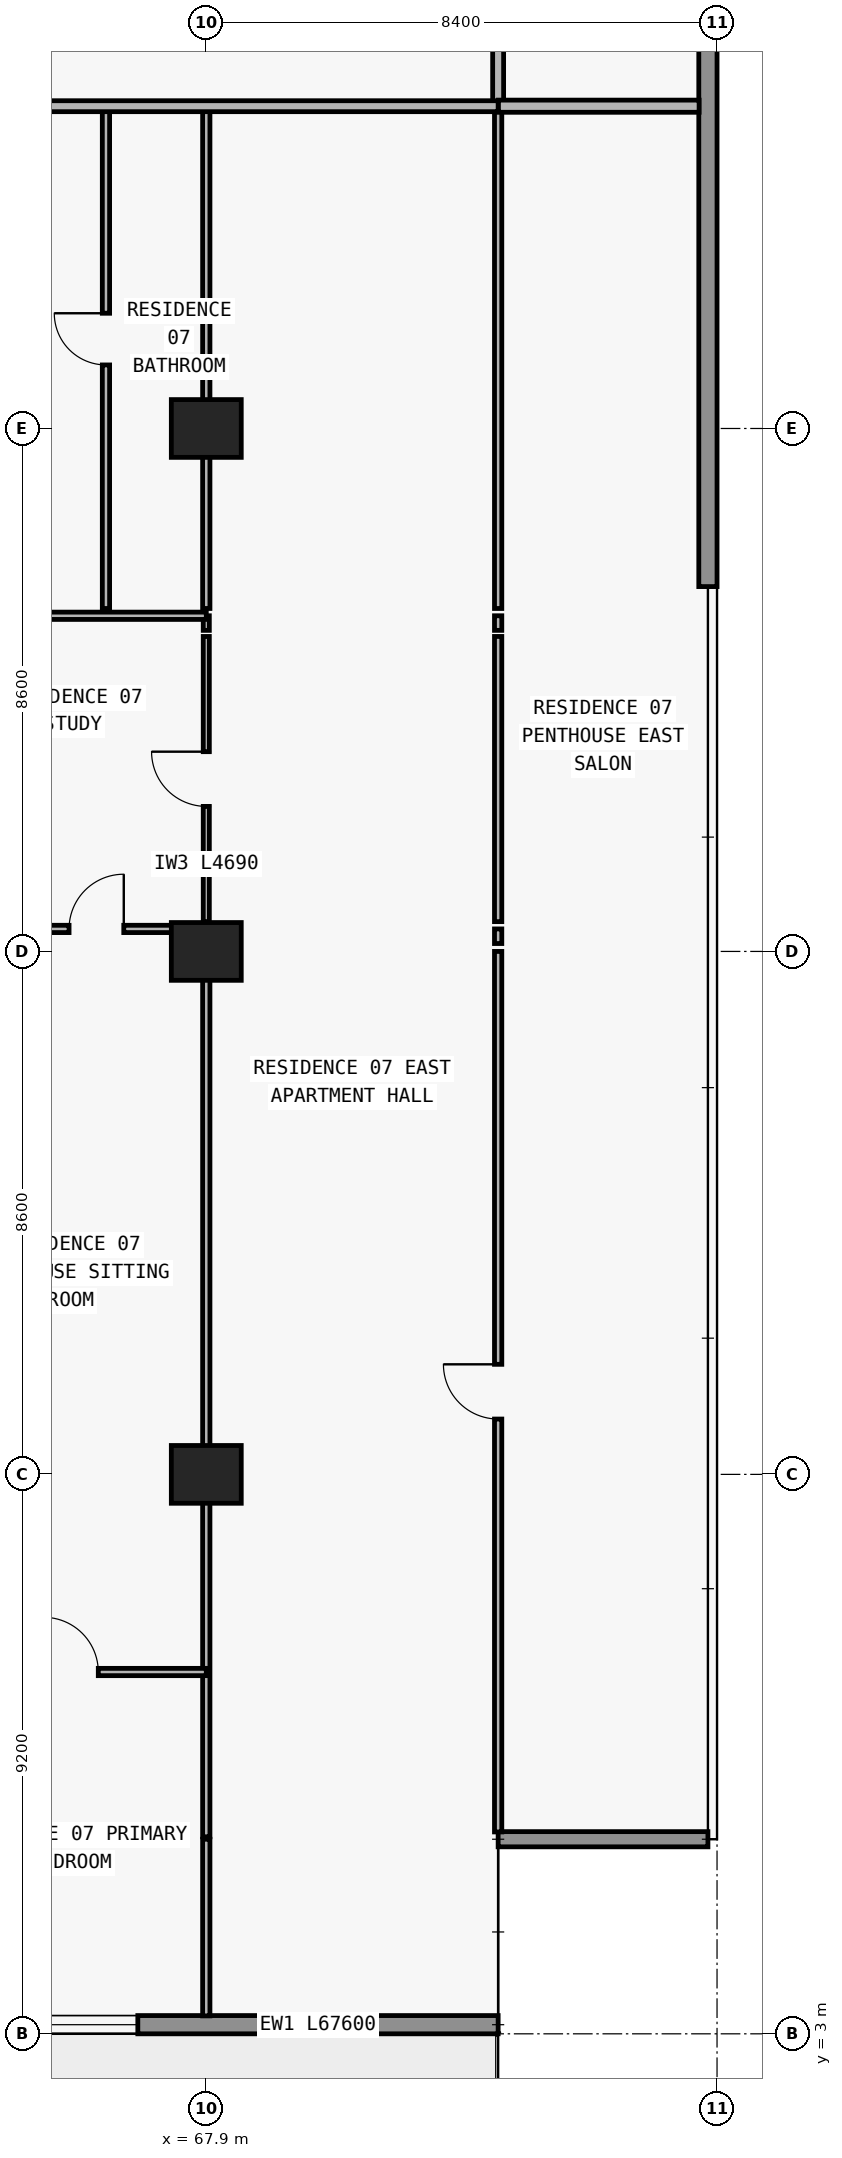
"""IFC4 building model, lengths in metres.
Left out: names, types, materials, properties, quantities, classifications, styles, units other than length and angle.
Written with IfcOpenShell. Run it as: python <this file> out.ifc"""

import sys

from ifc_helpers import new_model, si_unit, direction, frame, frame_2d, origin, origin_2d, place, context, subcontext, project, spatial, rectangle, extrude, element, fill, save


model = new_model("IFC4")
c1 = context("Model", 3, precision=1e-05, world=origin(), true_north=direction((0.0, 1.0)))
c2 = subcontext(c1, "Body", "Model", "MODEL_VIEW")
j1 = project(units=[si_unit("LENGTHUNIT", "METRE"), si_unit("PLANEANGLEUNIT", "RADIAN")], contexts=[c1])
p1 = place(None, origin())
s1 = spatial("IfcSite", under=j1, at=p1, CompositionType="ELEMENT")
p2 = place(p1, origin())
s2 = spatial("IfcBuilding", under=s1, at=p2, CompositionType="ELEMENT")
p3 = place(p2, frame((0.0, 0.0, 66.3)))
s3 = spatial("IfcBuildingStorey", under=s2, at=p3, CompositionType="ELEMENT", Elevation=66.3)
for number, where, z_axis, x_axis in (
    (1, (67.9, 12.2, 0.0), (0.0, 0.0, 1.0), (1.0, 0.0, 0.0)),
    (2, (67.9, 20.8, 0.0), (0.0, 0.0, 1.0), (1.0, 0.0, 0.0)),
    (3, (67.9, 29.4, 0.0), (0.0, 0.0, 1.0), (1.0, 0.0, 0.0)),
):
    element("IfcColumn", number, at=place(p3, frame(where, z_axis=z_axis, x_axis=x_axis)), inside=s3, PredefinedType="COLUMN", context=c2, shape_type="SweptSolid", body=[
        extrude(rectangle(XDim=1.15, YDim=0.95, at=origin_2d()), origin(), (0.0, 0.0, 1.0), 3.05),
    ])
p4 = place(p3, frame((72.7, 3.15, 0.0), z_axis=(0.0, 0.0, 1.0), x_axis=(-1.0, 0.0, 0.0)))
e4 = element("IfcWall", 4, at=p4, inside=s3, PredefinedType="STANDARD", context=c2, shape_type="SweptSolid", body=[
    extrude(rectangle(XDim=67.6, YDim=0.3, at=frame_2d((33.8, 0.0))), origin(), (0.0, 0.0, 1.0), 3.05),
])
p5 = place(p4, frame((59.826, 0.0, 0.0)))
e5 = element("IfcOpeningElement", 5, at=p5, cuts=e4, PredefinedType="OPENING", context=c2, shape_type="SweptSolid", body=[
    extrude(rectangle(XDim=2.0, YDim=2.3, at=frame_2d((1.0, 1.15))), frame((0.0, 0.16, 0.0), z_axis=(0.0, -1.0, 0.0), x_axis=(1.0, 0.0, 0.0)), (0.0, 0.0, 1.0), 0.32),
])
p6 = place(p4, frame((55.526, 0.0, 0.85)))
e6 = element("IfcOpeningElement", 6, at=p6, cuts=e4, PredefinedType="OPENING", context=c2, shape_type="SweptSolid", body=[
    extrude(rectangle(XDim=2.2, YDim=1.55, at=frame_2d((1.1, 0.775))), frame((0.0, 0.16, 0.0), z_axis=(0.0, -1.0, 0.0), x_axis=(1.0, 0.0, 0.0)), (0.0, 0.0, 1.0), 0.32),
])
p7 = place(p4, frame((51.09, 0.0, 0.0)))
e7 = element("IfcOpeningElement", 7, at=p7, cuts=e4, PredefinedType="OPENING", context=c2, shape_type="SweptSolid", body=[
    extrude(rectangle(XDim=2.0, YDim=2.3, at=frame_2d((1.0, 1.15))), frame((0.0, 0.16, 0.0), z_axis=(0.0, -1.0, 0.0), x_axis=(1.0, 0.0, 0.0)), (0.0, 0.0, 1.0), 0.32),
])
p8 = place(p4, frame((46.99, 0.0, 0.85)))
e8 = element("IfcOpeningElement", 8, at=p8, cuts=e4, PredefinedType="OPENING", context=c2, shape_type="SweptSolid", body=[
    extrude(rectangle(XDim=1.8, YDim=1.55, at=frame_2d((0.9, 0.775))), frame((0.0, 0.16, 0.0), z_axis=(0.0, -1.0, 0.0), x_axis=(1.0, 0.0, 0.0)), (0.0, 0.0, 1.0), 0.32),
])
p9 = place(p4, frame((43.026, 0.0, 0.0)))
e9 = element("IfcOpeningElement", 9, at=p9, cuts=e4, PredefinedType="OPENING", context=c2, shape_type="SweptSolid", body=[
    extrude(rectangle(XDim=2.0, YDim=2.3, at=frame_2d((1.0, 1.15))), frame((0.0, 0.16, 0.0), z_axis=(0.0, -1.0, 0.0), x_axis=(1.0, 0.0, 0.0)), (0.0, 0.0, 1.0), 0.32),
])
p10 = place(p4, frame((38.726, 0.0, 0.85)))
e10 = element("IfcOpeningElement", 10, at=p10, cuts=e4, PredefinedType="OPENING", context=c2, shape_type="SweptSolid", body=[
    extrude(rectangle(XDim=2.2, YDim=1.55, at=frame_2d((1.1, 0.775))), frame((0.0, 0.16, 0.0), z_axis=(0.0, -1.0, 0.0), x_axis=(1.0, 0.0, 0.0)), (0.0, 0.0, 1.0), 0.32),
])
p11 = place(p4, frame((34.51, 0.0, 0.0)))
e11 = element("IfcOpeningElement", 11, at=p11, cuts=e4, PredefinedType="OPENING", context=c2, shape_type="SweptSolid", body=[
    extrude(rectangle(XDim=2.0, YDim=2.3, at=frame_2d((1.0, 1.15))), frame((0.0, 0.16, 0.0), z_axis=(0.0, -1.0, 0.0), x_axis=(1.0, 0.0, 0.0)), (0.0, 0.0, 1.0), 0.32),
])
p12 = place(p4, frame((30.81, 0.0, 0.85)))
e12 = element("IfcOpeningElement", 12, at=p12, cuts=e4, PredefinedType="OPENING", context=c2, shape_type="SweptSolid", body=[
    extrude(rectangle(XDim=1.8, YDim=1.55, at=frame_2d((0.9, 0.775))), frame((0.0, 0.16, 0.0), z_axis=(0.0, -1.0, 0.0), x_axis=(1.0, 0.0, 0.0)), (0.0, 0.0, 1.0), 0.32),
])
p13 = place(p4, frame((27.026, 0.0, 0.0)))
e13 = element("IfcOpeningElement", 13, at=p13, cuts=e4, PredefinedType="OPENING", context=c2, shape_type="SweptSolid", body=[
    extrude(rectangle(XDim=2.0, YDim=2.3, at=frame_2d((1.0, 1.15))), frame((0.0, 0.16, 0.0), z_axis=(0.0, -1.0, 0.0), x_axis=(1.0, 0.0, 0.0)), (0.0, 0.0, 1.0), 0.32),
])
p14 = place(p4, frame((22.726, 0.0, 0.85)))
e14 = element("IfcOpeningElement", 14, at=p14, cuts=e4, PredefinedType="OPENING", context=c2, shape_type="SweptSolid", body=[
    extrude(rectangle(XDim=2.2, YDim=1.55, at=frame_2d((1.1, 0.775))), frame((0.0, 0.16, 0.0), z_axis=(0.0, -1.0, 0.0), x_axis=(1.0, 0.0, 0.0)), (0.0, 0.0, 1.0), 0.32),
])
p15 = place(p4, frame((18.29, 0.0, 0.0)))
e15 = element("IfcOpeningElement", 15, at=p15, cuts=e4, PredefinedType="OPENING", context=c2, shape_type="SweptSolid", body=[
    extrude(rectangle(XDim=2.0, YDim=2.3, at=frame_2d((1.0, 1.15))), frame((0.0, 0.16, 0.0), z_axis=(0.0, -1.0, 0.0), x_axis=(1.0, 0.0, 0.0)), (0.0, 0.0, 1.0), 0.32),
])
p16 = place(p4, frame((14.19, 0.0, 0.85)))
e16 = element("IfcOpeningElement", 16, at=p16, cuts=e4, PredefinedType="OPENING", context=c2, shape_type="SweptSolid", body=[
    extrude(rectangle(XDim=1.8, YDim=1.55, at=frame_2d((0.9, 0.775))), frame((0.0, 0.16, 0.0), z_axis=(0.0, -1.0, 0.0), x_axis=(1.0, 0.0, 0.0)), (0.0, 0.0, 1.0), 0.32),
])
p17 = place(p4, frame((10.226, 0.0, 0.0)))
e17 = element("IfcOpeningElement", 17, at=p17, cuts=e4, PredefinedType="OPENING", context=c2, shape_type="SweptSolid", body=[
    extrude(rectangle(XDim=2.0, YDim=2.3, at=frame_2d((1.0, 1.15))), frame((0.0, 0.16, 0.0), z_axis=(0.0, -1.0, 0.0), x_axis=(1.0, 0.0, 0.0)), (0.0, 0.0, 1.0), 0.32),
])
p18 = place(p4, frame((5.926, 0.0, 0.85)))
e18 = element("IfcOpeningElement", 18, at=p18, cuts=e4, PredefinedType="OPENING", context=c2, shape_type="SweptSolid", body=[
    extrude(rectangle(XDim=2.2, YDim=1.55, at=frame_2d((1.1, 0.775))), frame((0.0, 0.16, 0.0), z_axis=(0.0, -1.0, 0.0), x_axis=(1.0, 0.0, 0.0)), (0.0, 0.0, 1.0), 0.32),
])
p19 = place(p3, frame((72.7, 6.2, 0.0), z_axis=(0.0, 0.0, 1.0), x_axis=(1.0, 0.0, 0.0)))
e19 = element("IfcWall", 19, at=p19, inside=s3, PredefinedType="ELEMENTEDWALL", context=c2, shape_type="SweptSolid", body=[
    extrude(rectangle(XDim=3.45, YDim=0.25, at=frame_2d((1.725, 0.0))), origin(), (0.0, 0.0, 1.0), 3.05),
])
p20 = place(p3, frame((76.15, 47.4, 0.0), z_axis=(0.0, 0.0, 1.0), x_axis=(0.0, -1.0, 0.0)))
e20 = element("IfcWall", 20, at=p20, inside=s3, PredefinedType="STANDARD", context=c2, shape_type="SweptSolid", body=[
    extrude(rectangle(XDim=20.6, YDim=0.3, at=frame_2d((10.3, 0.0))), origin(), (0.0, 0.0, 1.0), 3.05),
])
p21 = place(p3, frame((66.25, 26.44, 0.0), z_axis=(0.0, 0.0, 1.0), x_axis=(0.0, 1.0, 0.0)))
e21 = element("IfcWall", 21, at=p21, inside=s3, PredefinedType="PARTITIONING", context=c2, shape_type="SweptSolid", body=[
    extrude(rectangle(XDim=8.26, YDim=0.12, at=frame_2d((4.13, 0.0))), origin(), (0.0, 0.0, 1.0), 3.05),
])
p22 = place(p21, frame((4.005, 0.0, 0.0)))
e22 = element("IfcOpeningElement", 22, at=p22, cuts=e21, PredefinedType="OPENING", context=c2, shape_type="SweptSolid", body=[
    extrude(rectangle(XDim=0.85, YDim=2.1, at=frame_2d((0.425, 1.05))), frame((0.0, 0.07, 0.0), z_axis=(0.0, -1.0, 0.0), x_axis=(1.0, 0.0, 0.0)), (0.0, 0.0, 1.0), 0.14),
])
p23 = place(p3, frame((67.9, 3.295, 0.0), z_axis=(0.0, 0.0, 1.0), x_axis=(0.0, 1.0, 0.0)))
e23 = element("IfcWall", 23, at=p23, inside=s3, PredefinedType="PARTITIONING", context=c2, shape_type="SweptSolid", body=[
    extrude(rectangle(XDim=2.905, YDim=0.12, at=frame_2d((1.453, 0.0))), origin(), (0.0, 0.0, 1.0), 3.05),
])
p24 = place(p3, frame((67.9, 6.24, 0.0), z_axis=(0.0, 0.0, 1.0), x_axis=(0.0, 1.0, 0.0)))
e24 = element("IfcWall", 24, at=p24, inside=s3, PredefinedType="PARTITIONING", context=c2, shape_type="SweptSolid", body=[
    extrude(rectangle(XDim=14.56, YDim=0.12, at=frame_2d((7.28, 0.0))), origin(), (0.0, 0.0, 1.0), 2.11),
])
p25 = place(p3, frame((67.9, 20.93, 0.0), z_axis=(0.0, 0.0, 1.0), x_axis=(0.0, 1.0, 0.0)))
e25 = element("IfcWall", 25, at=p25, inside=s3, PredefinedType="PARTITIONING", context=c2, shape_type="SweptSolid", body=[
    extrude(rectangle(XDim=0.24, YDim=0.12, at=frame_2d((0.12, 0.0))), origin(), (0.0, 0.0, 1.0), 3.05),
])
p26 = place(p3, frame((67.9, 21.29, 0.0), z_axis=(0.0, 0.0, 1.0), x_axis=(0.0, 1.0, 0.0)))
e26 = element("IfcWall", 26, at=p26, inside=s3, PredefinedType="MOVABLE", context=c2, shape_type="SweptSolid", body=[
    extrude(rectangle(XDim=4.69, YDim=0.1, at=frame_2d((2.345, 0.0))), origin(), (0.0, 0.0, 1.0), 2.11),
])
p27 = place(p26, frame((1.895, 0.0, 0.0)))
e27 = element("IfcOpeningElement", 27, at=p27, cuts=e26, PredefinedType="OPENING", context=c2, shape_type="SweptSolid", body=[
    extrude(rectangle(XDim=0.9, YDim=2.06, at=frame_2d((0.45, 1.03))), frame((0.0, 0.06, 0.0), z_axis=(0.0, -1.0, 0.0), x_axis=(1.0, 0.0, 0.0)), (0.0, 0.0, 1.0), 0.12),
])
p28 = place(p3, frame((67.9, 26.08, 0.0), z_axis=(0.0, 0.0, 1.0), x_axis=(0.0, 1.0, 0.0)))
e28 = element("IfcWall", 28, at=p28, inside=s3, PredefinedType="MOVABLE", context=c2, shape_type="SweptSolid", body=[
    extrude(rectangle(XDim=0.24, YDim=0.1, at=frame_2d((0.12, 0.0))), origin(), (0.0, 0.0, 1.0), 2.11),
])
p29 = place(p3, frame((67.9, 26.44, 0.0), z_axis=(0.0, 0.0, 1.0), x_axis=(0.0, 1.0, 0.0)))
e29 = element("IfcWall", 29, at=p29, inside=s3, PredefinedType="PARTITIONING", context=c2, shape_type="SweptSolid", body=[
    extrude(rectangle(XDim=8.26, YDim=0.12, at=frame_2d((4.13, 0.0))), origin(), (0.0, 0.0, 1.0), 2.11),
])
p30 = place(p3, frame((72.7, 6.32, 0.0), z_axis=(0.0, 0.0, 1.0), x_axis=(0.0, 1.0, 0.0)))
e30 = element("IfcWall", 30, at=p30, inside=s3, PredefinedType="PARTITIONING", context=c2, shape_type="SweptSolid", body=[
    extrude(rectangle(XDim=14.48, YDim=0.12, at=frame_2d((7.24, 0.0))), origin(), (0.0, 0.0, 1.0), 3.05),
])
p31 = place(p30, frame((6.79, 0.0, 0.0)))
e31 = element("IfcOpeningElement", 31, at=p31, cuts=e30, PredefinedType="OPENING", context=c2, shape_type="SweptSolid", body=[
    extrude(rectangle(XDim=0.9, YDim=2.15, at=frame_2d((0.45, 1.075))), frame((0.0, 0.07, 0.0), z_axis=(0.0, -1.0, 0.0), x_axis=(1.0, 0.0, 0.0)), (0.0, 0.0, 1.0), 0.14),
])
p32 = place(p3, frame((72.7, 20.93, 0.0), z_axis=(0.0, 0.0, 1.0), x_axis=(0.0, 1.0, 0.0)))
e32 = element("IfcWall", 32, at=p32, inside=s3, PredefinedType="PARTITIONING", context=c2, shape_type="SweptSolid", body=[
    extrude(rectangle(XDim=0.24, YDim=0.12, at=frame_2d((0.12, 0.0))), origin(), (0.0, 0.0, 1.0), 3.05),
])
p33 = place(p3, frame((72.7, 21.29, 0.0), z_axis=(0.0, 0.0, 1.0), x_axis=(0.0, 1.0, 0.0)))
e33 = element("IfcWall", 33, at=p33, inside=s3, PredefinedType="PARTITIONING", context=c2, shape_type="SweptSolid", body=[
    extrude(rectangle(XDim=4.69, YDim=0.12, at=frame_2d((2.345, 0.0))), origin(), (0.0, 0.0, 1.0), 3.05),
])
p34 = place(p3, frame((72.7, 26.08, 0.0), z_axis=(0.0, 0.0, 1.0), x_axis=(0.0, 1.0, 0.0)))
e34 = element("IfcWall", 34, at=p34, inside=s3, PredefinedType="PARTITIONING", context=c2, shape_type="SweptSolid", body=[
    extrude(rectangle(XDim=0.24, YDim=0.12, at=frame_2d((0.12, 0.0))), origin(), (0.0, 0.0, 1.0), 3.05),
])
p35 = place(p3, frame((72.7, 26.44, 0.0), z_axis=(0.0, 0.0, 1.0), x_axis=(0.0, 1.0, 0.0)))
e35 = element("IfcWall", 35, at=p35, inside=s3, PredefinedType="PARTITIONING", context=c2, shape_type="SweptSolid", body=[
    extrude(rectangle(XDim=8.26, YDim=0.12, at=frame_2d((4.13, 0.0))), origin(), (0.0, 0.0, 1.0), 3.05),
])
p36 = place(p3, frame((72.7, 34.705, 0.0), z_axis=(0.0, 0.0, 1.0), x_axis=(0.0, 1.0, 0.0)))
e36 = element("IfcWall", 36, at=p36, inside=s3, PredefinedType="PARTITIONING", context=c2, shape_type="SweptSolid", body=[
    extrude(rectangle(XDim=2.195, YDim=0.18, at=frame_2d((1.097, 0.0))), origin(), (0.0, 0.0, 1.0), 3.05),
])
p37 = place(p3, frame((63.448, 8.95, 0.0), z_axis=(0.0, 0.0, 1.0), x_axis=(1.0, 0.0, 0.0)))
e37 = element("IfcWall", 37, at=p37, inside=s3, PredefinedType="PARTITIONING", context=c2, shape_type="SweptSolid", body=[
    extrude(rectangle(XDim=4.452, YDim=0.12, at=frame_2d((2.226, 0.0))), origin(), (0.0, 0.0, 1.0), 3.05),
])
p38 = place(p37, frame((1.776, 0.0, 0.0)))
e38 = element("IfcOpeningElement", 38, at=p38, cuts=e37, PredefinedType="OPENING", context=c2, shape_type="SweptSolid", body=[
    extrude(rectangle(XDim=0.9, YDim=2.15, at=frame_2d((0.45, 1.075))), frame((0.0, 0.07, 0.0), z_axis=(0.0, -1.0, 0.0), x_axis=(1.0, 0.0, 0.0)), (0.0, 0.0, 1.0), 0.14),
])
p39 = place(p3, frame((59.5, 21.17, 0.0), z_axis=(0.0, 0.0, 1.0), x_axis=(1.0, 0.0, 0.0)))
e39 = element("IfcWall", 39, at=p39, inside=s3, PredefinedType="PARTITIONING", context=c2, shape_type="SweptSolid", body=[
    extrude(rectangle(XDim=8.4, YDim=0.12, at=frame_2d((4.2, 0.0))), origin(), (0.0, 0.0, 1.0), 3.05),
])
p40 = place(p39, frame((1.524, 0.0, 0.0)))
e40 = element("IfcOpeningElement", 40, at=p40, cuts=e39, PredefinedType="OPENING", context=c2, shape_type="SweptSolid", body=[
    extrude(rectangle(XDim=0.9, YDim=2.15, at=frame_2d((0.45, 1.075))), frame((0.0, 0.07, 0.0), z_axis=(0.0, -1.0, 0.0), x_axis=(1.0, 0.0, 0.0)), (0.0, 0.0, 1.0), 0.14),
])
p41 = place(p39, frame((6.143, 0.0, 0.0)))
e41 = element("IfcOpeningElement", 41, at=p41, cuts=e39, PredefinedType="OPENING", context=c2, shape_type="SweptSolid", body=[
    extrude(rectangle(XDim=0.9, YDim=2.15, at=frame_2d((0.45, 1.075))), frame((0.0, 0.07, 0.0), z_axis=(0.0, -1.0, 0.0), x_axis=(1.0, 0.0, 0.0)), (0.0, 0.0, 1.0), 0.14),
])
p42 = place(p3, frame((59.5, 26.32, 0.0), z_axis=(0.0, 0.0, 1.0), x_axis=(1.0, 0.0, 0.0)))
e42 = element("IfcWall", 42, at=p42, inside=s3, PredefinedType="PARTITIONING", context=c2, shape_type="SweptSolid", body=[
    extrude(rectangle(XDim=8.4, YDim=0.12, at=frame_2d((4.2, 0.0))), origin(), (0.0, 0.0, 1.0), 3.05),
])
p43 = place(p42, frame((1.943, 0.0, 0.0)))
e43 = element("IfcOpeningElement", 43, at=p43, cuts=e42, PredefinedType="OPENING", context=c2, shape_type="SweptSolid", body=[
    extrude(rectangle(XDim=0.9, YDim=2.15, at=frame_2d((0.45, 1.075))), frame((0.0, 0.07, 0.0), z_axis=(0.0, -1.0, 0.0), x_axis=(1.0, 0.0, 0.0)), (0.0, 0.0, 1.0), 0.14),
])
p44 = place(p3, frame((26.7, 34.7, 0.0), z_axis=(0.0, 0.0, 1.0), x_axis=(1.0, 0.0, 0.0)))
e44 = element("IfcWall", 44, at=p44, inside=s3, PredefinedType="PARTITIONING", context=c2, shape_type="SweptSolid", body=[
    extrude(rectangle(XDim=46.0, YDim=0.18, at=frame_2d((23.0, 0.0))), origin(), (0.0, 0.0, 1.0), 3.05),
])
p45 = place(p44, frame((2.875, 0.0, 0.0)))
e45 = element("IfcOpeningElement", 45, at=p45, cuts=e44, PredefinedType="OPENING", context=c2, shape_type="SweptSolid", body=[
    extrude(rectangle(XDim=1.0, YDim=2.2, at=frame_2d((0.5, 1.1))), frame((0.0, 0.1, 0.0), z_axis=(0.0, -1.0, 0.0), x_axis=(1.0, 0.0, 0.0)), (0.0, 0.0, 1.0), 0.2),
])
p46 = place(p44, frame((10.875, 0.0, 0.0)))
e46 = element("IfcOpeningElement", 46, at=p46, cuts=e44, PredefinedType="OPENING", context=c2, shape_type="SweptSolid", body=[
    extrude(rectangle(XDim=1.0, YDim=2.2, at=frame_2d((0.5, 1.1))), frame((0.0, 0.1, 0.0), z_axis=(0.0, -1.0, 0.0), x_axis=(1.0, 0.0, 0.0)), (0.0, 0.0, 1.0), 0.2),
])
p47 = place(p44, frame((18.875, 0.0, 0.0)))
e47 = element("IfcOpeningElement", 47, at=p47, cuts=e44, PredefinedType="OPENING", context=c2, shape_type="SweptSolid", body=[
    extrude(rectangle(XDim=1.0, YDim=2.2, at=frame_2d((0.5, 1.1))), frame((0.0, 0.1, 0.0), z_axis=(0.0, -1.0, 0.0), x_axis=(1.0, 0.0, 0.0)), (0.0, 0.0, 1.0), 0.2),
])
p48 = place(p44, frame((27.275, 0.0, 0.0)))
e48 = element("IfcOpeningElement", 48, at=p48, cuts=e44, PredefinedType="OPENING", context=c2, shape_type="SweptSolid", body=[
    extrude(rectangle(XDim=1.0, YDim=2.2, at=frame_2d((0.5, 1.1))), frame((0.0, 0.1, 0.0), z_axis=(0.0, -1.0, 0.0), x_axis=(1.0, 0.0, 0.0)), (0.0, 0.0, 1.0), 0.2),
])
p49 = place(p44, frame((35.675, 0.0, 0.0)))
e49 = element("IfcOpeningElement", 49, at=p49, cuts=e44, PredefinedType="OPENING", context=c2, shape_type="SweptSolid", body=[
    extrude(rectangle(XDim=1.0, YDim=2.2, at=frame_2d((0.5, 1.1))), frame((0.0, 0.1, 0.0), z_axis=(0.0, -1.0, 0.0), x_axis=(1.0, 0.0, 0.0)), (0.0, 0.0, 1.0), 0.2),
])
p50 = place(p3, frame((72.705, 34.7, 0.0), z_axis=(0.0, 0.0, 1.0), x_axis=(1.0, 0.0, 0.0)))
e50 = element("IfcWall", 50, at=p50, inside=s3, PredefinedType="PARTITIONING", context=c2, shape_type="SweptSolid", body=[
    extrude(rectangle(XDim=3.3, YDim=0.2, at=frame_2d((1.65, 0.0))), origin(), (0.0, 0.0, 1.0), 3.05),
])
p51 = place(p18, origin())
e51 = element("IfcWindow", 51, at=p51, inside=s3, PartitioningType="SINGLE_PANEL", PredefinedType="WINDOW", context=c2, shape_type="SweptSolid", body=[
    extrude(rectangle(XDim=2.2, YDim=1.55, at=frame_2d((1.1, 0.775))), frame((0.0, 0.03, 0.0), z_axis=(0.0, -1.0, 0.0), x_axis=(1.0, 0.0, 0.0)), (0.0, 0.0, 1.0), 0.06),
])
fill(e18, e51)
p52 = place(p22, origin())
e52 = element("IfcDoor", 52, at=p52, inside=s3, OperationType="SINGLE_SWING_RIGHT", PredefinedType="DOOR", context=c2, shape_type="SweptSolid", body=[
    extrude(rectangle(XDim=0.85, YDim=2.1, at=frame_2d((0.425, 1.05))), frame((0.0, 0.025, 0.0), z_axis=(0.0, -1.0, 0.0), x_axis=(1.0, 0.0, 0.0)), (0.0, 0.0, 1.0), 0.05),
])
fill(e22, e52)
p53 = place(p41, origin())
e53 = element("IfcDoor", 53, at=p53, inside=s3, OperationType="SINGLE_SWING_RIGHT", PredefinedType="DOOR", context=c2, shape_type="SweptSolid", body=[
    extrude(rectangle(XDim=0.9, YDim=2.15, at=frame_2d((0.45, 1.075))), frame((0.0, 0.025, 0.0), z_axis=(0.0, -1.0, 0.0), x_axis=(1.0, 0.0, 0.0)), (0.0, 0.0, 1.0), 0.05),
])
fill(e41, e53)
p54 = place(p38, origin())
e54 = element("IfcDoor", 54, at=p54, inside=s3, OperationType="SINGLE_SWING_LEFT", PredefinedType="DOOR", context=c2, shape_type="SweptSolid", body=[
    extrude(rectangle(XDim=0.9, YDim=2.15, at=frame_2d((0.45, 1.075))), frame((0.0, 0.025, 0.0), z_axis=(0.0, -1.0, 0.0), x_axis=(1.0, 0.0, 0.0)), (0.0, 0.0, 1.0), 0.05),
])
fill(e38, e54)
p55 = place(p27, origin())
e55 = element("IfcDoor", 55, at=p55, inside=s3, OperationType="SINGLE_SWING_RIGHT", PredefinedType="DOOR", context=c2, shape_type="SweptSolid", body=[
    extrude(rectangle(XDim=0.9, YDim=2.06, at=frame_2d((0.45, 1.03))), frame((0.0, 0.025, 0.0), z_axis=(0.0, -1.0, 0.0), x_axis=(1.0, 0.0, 0.0)), (0.0, 0.0, 1.0), 0.05),
])
fill(e27, e55)
p56 = place(p31, origin())
e56 = element("IfcDoor", 56, at=p56, inside=s3, OperationType="SINGLE_SWING_RIGHT", PredefinedType="DOOR", context=c2, shape_type="SweptSolid", body=[
    extrude(rectangle(XDim=0.9, YDim=2.15, at=frame_2d((0.45, 1.075))), frame((0.0, 0.025, 0.0), z_axis=(0.0, -1.0, 0.0), x_axis=(1.0, 0.0, 0.0)), (0.0, 0.0, 1.0), 0.05),
])
fill(e31, e56)
save(model, sys.argv[1])
